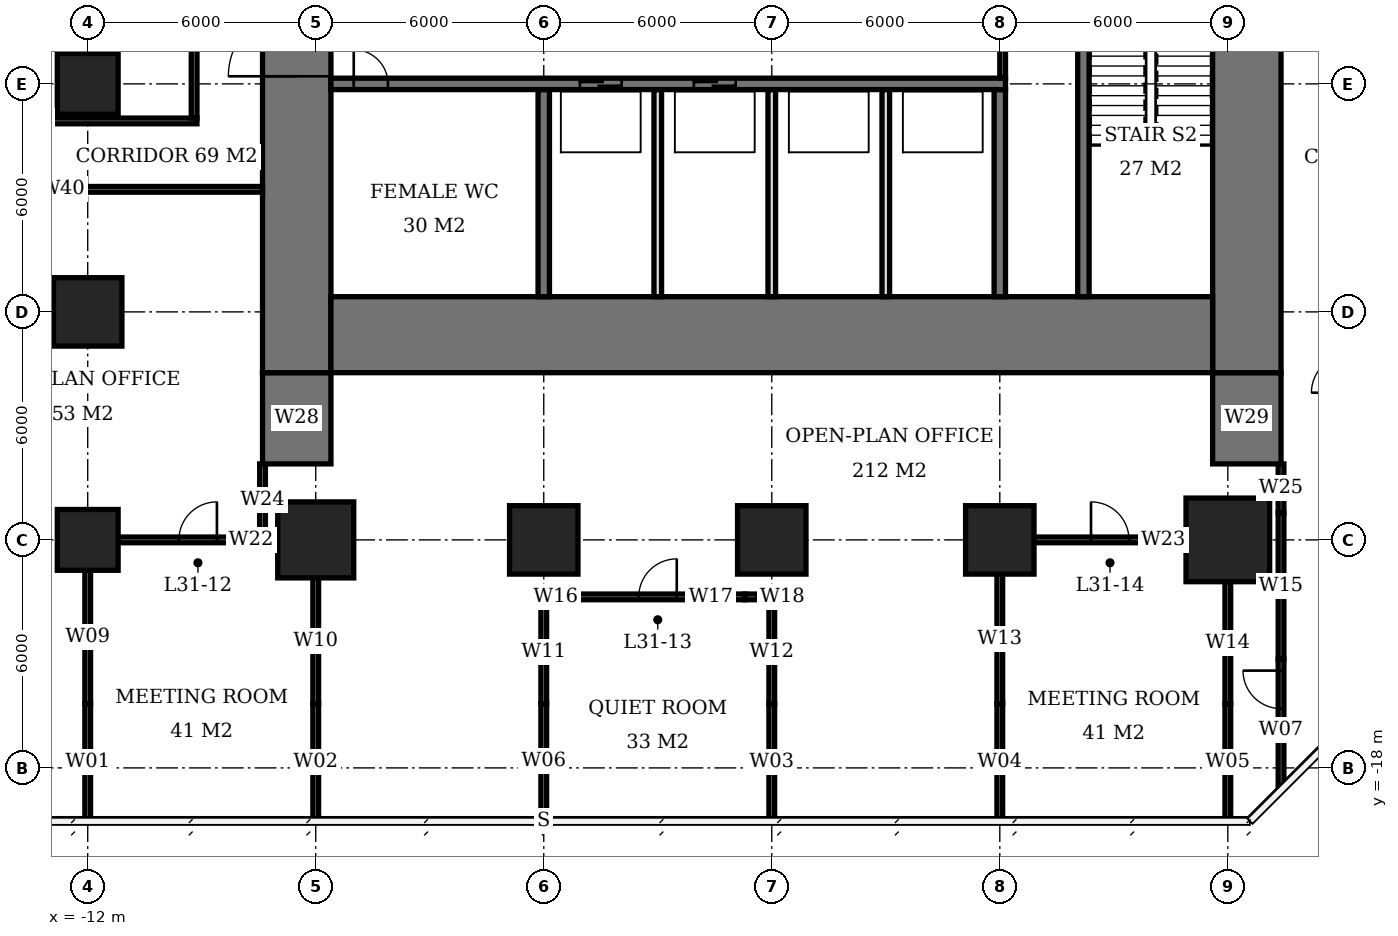
"""IFC4 building model, lengths in metres.
Left out: names, types, materials, properties, quantities, classifications, styles, units other than length and angle.
Written with IfcOpenShell. Run it as: python <this file> out.ifc"""

import sys

from ifc_helpers import new_model, si_unit, direction, frame, frame_2d, origin, origin_2d, place, context, subcontext, project, spatial, rectangle, extrude, element, fill, save


model = new_model("IFC4")
c1 = context("Model", 3, precision=1e-05, world=origin(), true_north=direction((0.0, 1.0)))
c2 = subcontext(c1, "Body", "Model", "MODEL_VIEW")
j1 = project(units=[si_unit("LENGTHUNIT", "METRE"), si_unit("PLANEANGLEUNIT", "RADIAN")], contexts=[c1])
p1 = place(None, origin())
s1 = spatial("IfcSite", under=j1, at=p1, CompositionType="ELEMENT")
p2 = place(p1, origin())
s2 = spatial("IfcBuilding", under=s1, at=p2, CompositionType="ELEMENT")
p3 = place(p2, frame((0.0, 0.0, 128.9)))
s3 = spatial("IfcBuildingStorey", under=s2, at=p3, CompositionType="ELEMENT", Elevation=128.9)
p4 = place(p3, frame((-12.0, -12.0, 0.0), z_axis=(0.0, 0.0, 1.0), x_axis=(1.0, 0.0, 0.0)))
e1 = element("IfcColumn", 1, at=p4, inside=s3, PredefinedType="COLUMN", context=c2, shape_type="SweptSolid", body=[
    extrude(rectangle(XDim=1.6, YDim=1.6, at=origin_2d()), origin(), (0.0, 0.0, 1.0), 3.9),
])
p5 = place(p3, frame((-12.0, -6.0, 0.0), z_axis=(0.0, 0.0, 1.0), x_axis=(1.0, 0.0, 0.0)))
e2 = element("IfcColumn", 2, at=p5, inside=s3, PredefinedType="COLUMN", context=c2, shape_type="SweptSolid", body=[
    extrude(rectangle(XDim=1.8, YDim=1.8, at=origin_2d()), origin(), (0.0, 0.0, 1.0), 3.9),
])
p6 = place(p3, frame((-12.0, 0.0, 0.0), z_axis=(0.0, 0.0, 1.0), x_axis=(1.0, 0.0, 0.0)))
e3 = element("IfcColumn", 3, at=p6, inside=s3, PredefinedType="COLUMN", context=c2, shape_type="SweptSolid", body=[
    extrude(rectangle(XDim=1.6, YDim=1.6, at=origin_2d()), origin(), (0.0, 0.0, 1.0), 3.9),
])
p7 = place(p3, frame((-6.0, -12.0, 0.0), z_axis=(0.0, 0.0, 1.0), x_axis=(1.0, 0.0, 0.0)))
e4 = element("IfcColumn", 4, at=p7, inside=s3, PredefinedType="COLUMN", context=c2, shape_type="SweptSolid", body=[
    extrude(rectangle(XDim=2.0, YDim=2.0, at=origin_2d()), origin(), (0.0, 0.0, 1.0), 3.9),
])
for number, where, z_axis, x_axis in (
    (5, (0.0, -12.0, 0.0), (0.0, 0.0, 1.0), (1.0, 0.0, 0.0)),
    (6, (6.0, -12.0, 0.0), (0.0, 0.0, 1.0), (1.0, 0.0, 0.0)),
    (7, (12.0, -12.0, 0.0), (0.0, 0.0, 1.0), (1.0, 0.0, 0.0)),
):
    element("IfcColumn", number, at=place(p3, frame(where, z_axis=z_axis, x_axis=x_axis)), inside=s3, PredefinedType="COLUMN", context=c2, shape_type="SweptSolid", body=[
        extrude(rectangle(XDim=1.8, YDim=1.8, at=origin_2d()), origin(), (0.0, 0.0, 1.0), 3.9),
    ])
p8 = place(p3, frame((18.0, -12.0, 0.0), z_axis=(0.0, 0.0, 1.0), x_axis=(1.0, 0.0, 0.0)))
e8 = element("IfcColumn", 8, at=p8, inside=s3, PredefinedType="COLUMN", context=c2, shape_type="SweptSolid", body=[
    extrude(rectangle(XDim=2.2, YDim=2.2, at=origin_2d()), origin(), (0.0, 0.0, 1.0), 3.9),
])
p9 = place(p3, frame((-5.6, -6.6, 0.0), z_axis=(0.0, 0.0, 1.0), x_axis=(1.0, 0.0, 0.0)))
e9 = element("IfcWall", 9, at=p9, inside=s3, PredefinedType="SHEAR", context=c2, shape_type="SweptSolid", body=[
    extrude(rectangle(XDim=23.2, YDim=2.0, at=frame_2d((11.6, 0.0))), origin(), (0.0, 0.0, 1.0), 3.9),
])
p10 = place(p3, frame((-6.5, -7.6, 0.0), z_axis=(0.0, 0.0, 1.0), x_axis=(0.0, 1.0, 0.0)))
e10 = element("IfcWall", 10, at=p10, inside=s3, PredefinedType="SHEAR", context=c2, shape_type="SweptSolid", body=[
    extrude(rectangle(XDim=21.2, YDim=1.8, at=frame_2d((10.6, 0.0))), origin(), (0.0, 0.0, 1.0), 3.9),
])
p11 = place(p10, frame((7.8, 0.0, 0.0)))
e11 = element("IfcOpeningElement", 11, at=p11, cuts=e10, PredefinedType="OPENING", context=c2, shape_type="SweptSolid", body=[
    extrude(rectangle(XDim=1.8, YDim=2.4, at=frame_2d((0.9, 1.2))), frame((0.0, 0.91, 0.0), z_axis=(0.0, -1.0, 0.0), x_axis=(1.0, 0.0, 0.0)), (0.0, 0.0, 1.0), 1.82),
])
p12 = place(p3, frame((18.5, -7.6, 0.0), z_axis=(0.0, 0.0, 1.0), x_axis=(0.0, 1.0, 0.0)))
e12 = element("IfcWall", 12, at=p12, inside=s3, PredefinedType="SHEAR", context=c2, shape_type="SweptSolid", body=[
    extrude(rectangle(XDim=21.2, YDim=1.8, at=frame_2d((10.6, 0.0))), origin(), (0.0, 0.0, 1.0), 3.9),
])
p13 = place(p12, frame((9.2, 0.0, 0.0)))
e13 = element("IfcOpeningElement", 13, at=p13, cuts=e12, PredefinedType="OPENING", context=c2, shape_type="SweptSolid", body=[
    extrude(rectangle(XDim=1.8, YDim=2.4, at=frame_2d((0.9, 1.2))), frame((0.0, 0.91, 0.0), z_axis=(0.0, -1.0, 0.0), x_axis=(1.0, 0.0, 0.0)), (0.0, 0.0, 1.0), 1.82),
])
for number, where, z_axis, x_axis in (
    (14, (-6.5, -10.0, 0.0), (0.0, 0.0, 1.0), (0.0, 1.0, 0.0)),
    (15, (18.5, -10.0, 0.0), (0.0, 0.0, 1.0), (0.0, 1.0, 0.0)),
):
    element("IfcWall", number, at=place(p3, frame(where, z_axis=z_axis, x_axis=x_axis)), inside=s3, PredefinedType="SHEAR", context=c2, shape_type="SweptSolid", body=[
        extrude(rectangle(XDim=2.4, YDim=1.8, at=frame_2d((1.2, 0.0))), origin(), (0.0, 0.0, 1.0), 3.9),
    ])
p14 = place(p3, frame((-5.6, 0.0, 0.0), z_axis=(0.0, 0.0, 1.0), x_axis=(1.0, 0.0, 0.0)))
e16 = element("IfcWall", 16, at=p14, inside=s3, PredefinedType="SHEAR", context=c2, shape_type="SweptSolid", body=[
    extrude(rectangle(XDim=17.75, YDim=0.3, at=frame_2d((8.875, 0.0))), origin(), (0.0, 0.0, 1.0), 3.9),
])
p15 = place(p14, frame((0.6, 0.0, 0.0)))
e17 = element("IfcOpeningElement", 17, at=p15, cuts=e16, PredefinedType="OPENING", context=c2, shape_type="SweptSolid", body=[
    extrude(rectangle(XDim=0.9, YDim=2.1, at=frame_2d((0.45, 1.05))), frame((0.0, 0.16, 0.0), z_axis=(0.0, -1.0, 0.0), x_axis=(1.0, 0.0, 0.0)), (0.0, 0.0, 1.0), 0.32),
])
p16 = place(p14, frame((6.55, 0.0, 0.0)))
e18 = element("IfcOpeningElement", 18, at=p16, cuts=e16, PredefinedType="OPENING", context=c2, shape_type="SweptSolid", body=[
    extrude(rectangle(XDim=1.1, YDim=2.1, at=frame_2d((0.55, 1.05))), frame((0.0, 0.16, 0.0), z_axis=(0.0, -1.0, 0.0), x_axis=(1.0, 0.0, 0.0)), (0.0, 0.0, 1.0), 0.32),
])
p17 = place(p14, frame((9.55, 0.0, 0.0)))
e19 = element("IfcOpeningElement", 19, at=p17, cuts=e16, PredefinedType="OPENING", context=c2, shape_type="SweptSolid", body=[
    extrude(rectangle(XDim=1.1, YDim=2.1, at=frame_2d((0.55, 1.05))), frame((0.0, 0.16, 0.0), z_axis=(0.0, -1.0, 0.0), x_axis=(1.0, 0.0, 0.0)), (0.0, 0.0, 1.0), 0.32),
])
for number, where, z_axis, x_axis in (
    (20, (0.0, -5.6, 0.0), (0.0, 0.0, 1.0), (0.0, 1.0, 0.0)),
    (21, (12.0, -5.6, 0.0), (0.0, 0.0, 1.0), (0.0, 1.0, 0.0)),
):
    element("IfcWall", number, at=place(p3, frame(where, z_axis=z_axis, x_axis=x_axis)), inside=s3, PredefinedType="SHEAR", context=c2, shape_type="SweptSolid", body=[
        extrude(rectangle(XDim=5.45, YDim=0.3, at=frame_2d((2.725, 0.0))), origin(), (0.0, 0.0, 1.0), 3.9),
    ])
p18 = place(p3, frame((14.2, -5.6, 0.0), z_axis=(0.0, 0.0, 1.0), x_axis=(0.0, 1.0, 0.0)))
e22 = element("IfcWall", 22, at=p18, inside=s3, PredefinedType="SHEAR", context=c2, shape_type="SweptSolid", body=[
    extrude(rectangle(XDim=8.45, YDim=0.3, at=frame_2d((4.225, 0.0))), origin(), (0.0, 0.0, 1.0), 3.9),
])
for number, where, z_axis, x_axis in (
    (23, (3.0, -5.6, 0.0), (0.0, 0.0, 1.0), (0.0, 1.0, 0.0)),
    (24, (6.0, -5.6, 0.0), (0.0, 0.0, 1.0), (0.0, 1.0, 0.0)),
    (25, (9.0, -5.6, 0.0), (0.0, 0.0, 1.0), (0.0, 1.0, 0.0)),
):
    element("IfcWall", number, at=place(p3, frame(where, z_axis=z_axis, x_axis=x_axis)), inside=s3, PredefinedType="SOLIDWALL", context=c2, shape_type="SweptSolid", body=[
        extrude(rectangle(XDim=5.45, YDim=0.2, at=frame_2d((2.725, 0.0))), origin(), (0.0, 0.0, 1.0), 3.9),
    ])
p19 = place(p3, frame((-0.075, -13.5, 0.0), z_axis=(0.0, 0.0, 1.0), x_axis=(1.0, 0.0, 0.0)))
e26 = element("IfcWall", 26, at=p19, inside=s3, PredefinedType="PARTITIONING", context=c2, shape_type="SweptSolid", body=[
    extrude(rectangle(XDim=0.785, YDim=0.15, at=frame_2d((0.393, 0.0))), origin(), (0.0, 0.0, 1.0), 2.65),
])
p20 = place(p3, frame((0.71, -13.5, 0.0), z_axis=(0.0, 0.0, 1.0), x_axis=(1.0, 0.0, 0.0)))
e27 = element("IfcWall", 27, at=p20, inside=s3, PredefinedType="PARTITIONING", context=c2, shape_type="SweptSolid", body=[
    extrude(rectangle(XDim=4.58, YDim=0.15, at=frame_2d((2.29, 0.0))), origin(), (0.0, 0.0, 1.0), 3.65),
])
p21 = place(p20, frame((1.79, 0.0, 0.0)))
e28 = element("IfcOpeningElement", 28, at=p21, cuts=e27, PredefinedType="OPENING", context=c2, shape_type="SweptSolid", body=[
    extrude(rectangle(XDim=1.0, YDim=2.1, at=frame_2d((0.5, 1.05))), frame((0.0, 0.085, 0.0), z_axis=(0.0, -1.0, 0.0), x_axis=(1.0, 0.0, 0.0)), (0.0, 0.0, 1.0), 0.17),
])
p22 = place(p3, frame((5.29, -13.5, 0.0), z_axis=(0.0, 0.0, 1.0), x_axis=(1.0, 0.0, 0.0)))
e29 = element("IfcWall", 29, at=p22, inside=s3, PredefinedType="PARTITIONING", context=c2, shape_type="SweptSolid", body=[
    extrude(rectangle(XDim=0.785, YDim=0.15, at=frame_2d((0.393, 0.0))), origin(), (0.0, 0.0, 1.0), 2.65),
])
p23 = place(p3, frame((-11.2, -12.0, 0.0), z_axis=(0.0, 0.0, 1.0), x_axis=(1.0, 0.0, 0.0)))
e30 = element("IfcWall", 30, at=p23, inside=s3, PredefinedType="PARTITIONING", context=c2, shape_type="SweptSolid", body=[
    extrude(rectangle(XDim=4.2, YDim=0.15, at=frame_2d((2.1, 0.0))), origin(), (0.0, 0.0, 1.0), 3.65),
])
p24 = place(p23, frame((1.6, 0.0, 0.0)))
e31 = element("IfcOpeningElement", 31, at=p24, cuts=e30, PredefinedType="OPENING", context=c2, shape_type="SweptSolid", body=[
    extrude(rectangle(XDim=1.0, YDim=2.1, at=frame_2d((0.5, 1.05))), frame((0.0, 0.085, 0.0), z_axis=(0.0, -1.0, 0.0), x_axis=(1.0, 0.0, 0.0)), (0.0, 0.0, 1.0), 0.17),
])
p25 = place(p3, frame((12.9, -12.0, 0.0), z_axis=(0.0, 0.0, 1.0), x_axis=(1.0, 0.0, 0.0)))
e32 = element("IfcWall", 32, at=p25, inside=s3, PredefinedType="PARTITIONING", context=c2, shape_type="SweptSolid", body=[
    extrude(rectangle(XDim=4.0, YDim=0.15, at=frame_2d((2.0, 0.0))), origin(), (0.0, 0.0, 1.0), 3.65),
])
p26 = place(p25, frame((1.5, 0.0, 0.0)))
e33 = element("IfcOpeningElement", 33, at=p26, cuts=e32, PredefinedType="OPENING", context=c2, shape_type="SweptSolid", body=[
    extrude(rectangle(XDim=1.0, YDim=2.1, at=frame_2d((0.5, 1.05))), frame((0.0, 0.085, 0.0), z_axis=(0.0, -1.0, 0.0), x_axis=(1.0, 0.0, 0.0)), (0.0, 0.0, 1.0), 0.17),
])
p27 = place(p3, frame((-12.0, -19.4, 0.0), z_axis=(0.0, 0.0, 1.0), x_axis=(0.0, 1.0, 0.0)))
e34 = element("IfcWall", 34, at=p27, inside=s3, PredefinedType="PARTITIONING", context=c2, shape_type="SweptSolid", body=[
    extrude(rectangle(XDim=3.09, YDim=0.15, at=frame_2d((1.545, 0.0))), origin(), (0.0, 0.0, 1.0), 3.65),
])
p28 = place(p3, frame((-12.0, -16.31, 0.0), z_axis=(0.0, 0.0, 1.0), x_axis=(0.0, 1.0, 0.0)))
e35 = element("IfcWall", 35, at=p28, inside=s3, PredefinedType="PARTITIONING", context=c2, shape_type="SweptSolid", body=[
    extrude(rectangle(XDim=3.51, YDim=0.15, at=frame_2d((1.755, 0.0))), origin(), (0.0, 0.0, 1.0), 2.65),
])
p29 = place(p3, frame((-6.0, -19.4, 0.0), z_axis=(0.0, 0.0, 1.0), x_axis=(0.0, 1.0, 0.0)))
e36 = element("IfcWall", 36, at=p29, inside=s3, PredefinedType="PARTITIONING", context=c2, shape_type="SweptSolid", body=[
    extrude(rectangle(XDim=3.09, YDim=0.15, at=frame_2d((1.545, 0.0))), origin(), (0.0, 0.0, 1.0), 3.65),
])
p30 = place(p3, frame((-6.0, -16.31, 0.0), z_axis=(0.0, 0.0, 1.0), x_axis=(0.0, 1.0, 0.0)))
e37 = element("IfcWall", 37, at=p30, inside=s3, PredefinedType="PARTITIONING", context=c2, shape_type="SweptSolid", body=[
    extrude(rectangle(XDim=3.31, YDim=0.15, at=frame_2d((1.655, 0.0))), origin(), (0.0, 0.0, 1.0), 2.65),
])
p31 = place(p3, frame((0.0, -19.35, 0.0), z_axis=(0.0, 0.0, 1.0), x_axis=(0.0, 1.0, 0.0)))
e38 = element("IfcWall", 38, at=p31, inside=s3, PredefinedType="PARTITIONING", context=c2, shape_type="SweptSolid", body=[
    extrude(rectangle(XDim=3.04, YDim=0.15, at=frame_2d((1.52, 0.0))), origin(), (0.0, 0.0, 1.0), 3.65),
])
p32 = place(p3, frame((0.0, -16.31, 0.0), z_axis=(0.0, 0.0, 1.0), x_axis=(0.0, 1.0, 0.0)))
e39 = element("IfcWall", 39, at=p32, inside=s3, PredefinedType="PARTITIONING", context=c2, shape_type="SweptSolid", body=[
    extrude(rectangle(XDim=2.735, YDim=0.15, at=frame_2d((1.368, 0.0))), origin(), (0.0, 0.0, 1.0), 2.65),
])
p33 = place(p3, frame((6.0, -19.4, 0.0), z_axis=(0.0, 0.0, 1.0), x_axis=(0.0, 1.0, 0.0)))
e40 = element("IfcWall", 40, at=p33, inside=s3, PredefinedType="PARTITIONING", context=c2, shape_type="SweptSolid", body=[
    extrude(rectangle(XDim=3.09, YDim=0.15, at=frame_2d((1.545, 0.0))), origin(), (0.0, 0.0, 1.0), 3.65),
])
p34 = place(p3, frame((6.0, -16.31, 0.0), z_axis=(0.0, 0.0, 1.0), x_axis=(0.0, 1.0, 0.0)))
e41 = element("IfcWall", 41, at=p34, inside=s3, PredefinedType="PARTITIONING", context=c2, shape_type="SweptSolid", body=[
    extrude(rectangle(XDim=2.735, YDim=0.15, at=frame_2d((1.368, 0.0))), origin(), (0.0, 0.0, 1.0), 2.65),
])
p35 = place(p3, frame((12.0, -19.4, 0.0), z_axis=(0.0, 0.0, 1.0), x_axis=(0.0, 1.0, 0.0)))
e42 = element("IfcWall", 42, at=p35, inside=s3, PredefinedType="PARTITIONING", context=c2, shape_type="SweptSolid", body=[
    extrude(rectangle(XDim=3.09, YDim=0.15, at=frame_2d((1.545, 0.0))), origin(), (0.0, 0.0, 1.0), 3.65),
])
p36 = place(p3, frame((12.0, -16.31, 0.0), z_axis=(0.0, 0.0, 1.0), x_axis=(0.0, 1.0, 0.0)))
e43 = element("IfcWall", 43, at=p36, inside=s3, PredefinedType="PARTITIONING", context=c2, shape_type="SweptSolid", body=[
    extrude(rectangle(XDim=3.41, YDim=0.15, at=frame_2d((1.705, 0.0))), origin(), (0.0, 0.0, 1.0), 2.65),
])
p37 = place(p3, frame((18.0, -19.4, 0.0), z_axis=(0.0, 0.0, 1.0), x_axis=(0.0, 1.0, 0.0)))
e44 = element("IfcWall", 44, at=p37, inside=s3, PredefinedType="PARTITIONING", context=c2, shape_type="SweptSolid", body=[
    extrude(rectangle(XDim=3.09, YDim=0.15, at=frame_2d((1.545, 0.0))), origin(), (0.0, 0.0, 1.0), 3.65),
])
p38 = place(p3, frame((18.0, -16.31, 0.0), z_axis=(0.0, 0.0, 1.0), x_axis=(0.0, 1.0, 0.0)))
e45 = element("IfcWall", 45, at=p38, inside=s3, PredefinedType="PARTITIONING", context=c2, shape_type="SweptSolid", body=[
    extrude(rectangle(XDim=3.21, YDim=0.15, at=frame_2d((1.605, 0.0))), origin(), (0.0, 0.0, 1.0), 2.65),
])
p39 = place(p3, frame((-17.925, -2.775, 0.0), z_axis=(0.0, 0.0, 1.0), x_axis=(1.0, 0.0, 0.0)))
e46 = element("IfcWall", 46, at=p39, inside=s3, PredefinedType="PARTITIONING", context=c2, shape_type="SweptSolid", body=[
    extrude(rectangle(XDim=10.525, YDim=0.15, at=frame_2d((5.263, 0.0))), origin(), (0.0, 0.0, 1.0), 3.65),
])
p40 = place(p39, frame((2.554, 0.0, 0.0)))
e47 = element("IfcOpeningElement", 47, at=p40, cuts=e46, PredefinedType="OPENING", context=c2, shape_type="SweptSolid", body=[
    extrude(rectangle(XDim=1.0, YDim=2.1, at=frame_2d((0.5, 1.05))), frame((0.0, 0.085, 0.0), z_axis=(0.0, -1.0, 0.0), x_axis=(1.0, 0.0, 0.0)), (0.0, 0.0, 1.0), 0.17),
])
p41 = place(p3, frame((-17.925, -0.975, 0.0), z_axis=(0.0, 0.0, 1.0), x_axis=(1.0, 0.0, 0.0)))
e48 = element("IfcWall", 48, at=p41, inside=s3, PredefinedType="PARTITIONING", context=c2, shape_type="SweptSolid", body=[
    extrude(rectangle(XDim=8.8, YDim=0.15, at=frame_2d((4.4, 0.0))), origin(), (0.0, 0.0, 1.0), 3.65),
])
p42 = place(p3, frame((-9.2, -0.9, 0.0), z_axis=(0.0, 0.0, 1.0), x_axis=(0.0, 1.0, 0.0)))
e49 = element("IfcWall", 49, at=p42, inside=s3, PredefinedType="PARTITIONING", context=c2, shape_type="SweptSolid", body=[
    extrude(rectangle(XDim=11.325, YDim=0.15, at=frame_2d((5.663, 0.0))), origin(), (0.0, 0.0, 1.0), 3.65),
])
p43 = place(p42, frame((3.441, 0.0, 0.0)))
e50 = element("IfcOpeningElement", 50, at=p43, cuts=e49, PredefinedType="OPENING", context=c2, shape_type="SweptSolid", body=[
    extrude(rectangle(XDim=1.0, YDim=2.1, at=frame_2d((0.5, 1.05))), frame((0.0, 0.085, 0.0), z_axis=(0.0, -1.0, 0.0), x_axis=(1.0, 0.0, 0.0)), (0.0, 0.0, 1.0), 0.17),
])
p44 = place(p3, frame((-7.4, -11.925, 0.0), z_axis=(0.0, 0.0, 1.0), x_axis=(0.0, 1.0, 0.0)))
e51 = element("IfcWall", 51, at=p44, inside=s3, PredefinedType="PARTITIONING", context=c2, shape_type="SweptSolid", body=[
    extrude(rectangle(XDim=1.925, YDim=0.15, at=frame_2d((0.962, 0.0))), origin(), (0.0, 0.0, 1.0), 3.65),
])
p45 = place(p3, frame((19.4, -18.489, 0.0), z_axis=(0.0, 0.0, 1.0), x_axis=(0.0, 1.0, 0.0)))
e52 = element("IfcWall", 52, at=p45, inside=s3, PredefinedType="PARTITIONING", context=c2, shape_type="SweptSolid", body=[
    extrude(rectangle(XDim=3.349, YDim=0.15, at=frame_2d((1.675, 0.0))), origin(), (0.0, 0.0, 1.0), 3.65),
])
p46 = place(p45, frame((2.049, 0.0, 0.0)))
e53 = element("IfcOpeningElement", 53, at=p46, cuts=e52, PredefinedType="OPENING", context=c2, shape_type="SweptSolid", body=[
    extrude(rectangle(XDim=1.0, YDim=2.1, at=frame_2d((0.5, 1.05))), frame((0.0, 0.085, 0.0), z_axis=(0.0, -1.0, 0.0), x_axis=(1.0, 0.0, 0.0)), (0.0, 0.0, 1.0), 0.17),
])
p47 = place(p3, frame((19.4, -15.14, 0.0), z_axis=(0.0, 0.0, 1.0), x_axis=(0.0, 1.0, 0.0)))
e54 = element("IfcWall", 54, at=p47, inside=s3, PredefinedType="PARTITIONING", context=c2, shape_type="SweptSolid", body=[
    extrude(rectangle(XDim=3.85, YDim=0.15, at=frame_2d((1.925, 0.0))), origin(), (0.0, 0.0, 1.0), 2.65),
])
p48 = place(p3, frame((19.4, -11.29, 0.0), z_axis=(0.0, 0.0, 1.0), x_axis=(0.0, 1.0, 0.0)))
e55 = element("IfcWall", 55, at=p48, inside=s3, PredefinedType="PARTITIONING", context=c2, shape_type="SweptSolid", body=[
    extrude(rectangle(XDim=1.29, YDim=0.15, at=frame_2d((0.645, 0.0))), origin(), (0.0, 0.0, 1.0), 3.65),
])
p49 = place(p3, frame((12.075, 0.15, 0.0), z_axis=(0.0, 0.0, 1.0), x_axis=(0.0, 1.0, 0.0)))
e56 = element("IfcWall", 56, at=p49, inside=s3, PredefinedType="PARTITIONING", context=c2, shape_type="SweptSolid", body=[
    extrude(rectangle(XDim=3.0, YDim=0.15, at=frame_2d((1.5, 0.0))), origin(), (0.0, 0.0, 1.0), 3.65),
])
p50 = place(p11, origin())
e57 = element("IfcDoor", 57, at=p50, inside=s3, OperationType="DOUBLE_DOOR_SINGLE_SWING", PredefinedType="DOOR", context=c2, shape_type="SweptSolid", body=[
    extrude(rectangle(XDim=1.8, YDim=2.4, at=frame_2d((0.9, 1.2))), frame((0.0, 0.025, 0.0), z_axis=(0.0, -1.0, 0.0), x_axis=(1.0, 0.0, 0.0)), (0.0, 0.0, 1.0), 0.05),
])
fill(e11, e57)
p51 = place(p15, origin())
e58 = element("IfcDoor", 58, at=p51, inside=s3, OperationType="SINGLE_SWING_LEFT", PredefinedType="DOOR", context=c2, shape_type="SweptSolid", body=[
    extrude(rectangle(XDim=0.9, YDim=2.1, at=frame_2d((0.45, 1.05))), frame((0.0, 0.025, 0.0), z_axis=(0.0, -1.0, 0.0), x_axis=(1.0, 0.0, 0.0)), (0.0, 0.0, 1.0), 0.05),
])
fill(e17, e58)
p52 = place(p16, origin())
e59 = element("IfcDoor", 59, at=p52, inside=s3, OperationType="DOUBLE_DOOR_SLIDING", PredefinedType="USERDEFINED", context=c2, shape_type="SweptSolid", body=[
    extrude(rectangle(XDim=1.1, YDim=2.1, at=frame_2d((0.55, 1.05))), frame((0.0, 0.025, 0.0), z_axis=(0.0, -1.0, 0.0), x_axis=(1.0, 0.0, 0.0)), (0.0, 0.0, 1.0), 0.05),
])
fill(e18, e59)
p53 = place(p17, origin())
e60 = element("IfcDoor", 60, at=p53, inside=s3, OperationType="DOUBLE_DOOR_SLIDING", PredefinedType="USERDEFINED", context=c2, shape_type="SweptSolid", body=[
    extrude(rectangle(XDim=1.1, YDim=2.1, at=frame_2d((0.55, 1.05))), frame((0.0, 0.025, 0.0), z_axis=(0.0, -1.0, 0.0), x_axis=(1.0, 0.0, 0.0)), (0.0, 0.0, 1.0), 0.05),
])
fill(e19, e60)
p54 = place(p24, origin())
e61 = element("IfcDoor", 61, at=p54, inside=s3, OperationType="SINGLE_SWING_RIGHT", PredefinedType="DOOR", context=c2, shape_type="SweptSolid", body=[
    extrude(rectangle(XDim=1.0, YDim=2.1, at=frame_2d((0.5, 1.05))), frame((0.0, 0.025, 0.0), z_axis=(0.0, -1.0, 0.0), x_axis=(1.0, 0.0, 0.0)), (0.0, 0.0, 1.0), 0.05),
])
fill(e31, e61)
p55 = place(p21, origin())
e62 = element("IfcDoor", 62, at=p55, inside=s3, OperationType="SINGLE_SWING_RIGHT", PredefinedType="DOOR", context=c2, shape_type="SweptSolid", body=[
    extrude(rectangle(XDim=1.0, YDim=2.1, at=frame_2d((0.5, 1.05))), frame((0.0, 0.025, 0.0), z_axis=(0.0, -1.0, 0.0), x_axis=(1.0, 0.0, 0.0)), (0.0, 0.0, 1.0), 0.05),
])
fill(e28, e62)
p56 = place(p26, origin())
e63 = element("IfcDoor", 63, at=p56, inside=s3, OperationType="SINGLE_SWING_LEFT", PredefinedType="DOOR", context=c2, shape_type="SweptSolid", body=[
    extrude(rectangle(XDim=1.0, YDim=2.1, at=frame_2d((0.5, 1.05))), frame((0.0, 0.025, 0.0), z_axis=(0.0, -1.0, 0.0), x_axis=(1.0, 0.0, 0.0)), (0.0, 0.0, 1.0), 0.05),
])
fill(e33, e63)
p57 = place(p46, origin())
e64 = element("IfcDoor", 64, at=p57, inside=s3, OperationType="SINGLE_SWING_RIGHT", PredefinedType="DOOR", context=c2, shape_type="SweptSolid", body=[
    extrude(rectangle(XDim=1.0, YDim=2.1, at=frame_2d((0.5, 1.05))), frame((0.0, 0.025, 0.0), z_axis=(0.0, -1.0, 0.0), x_axis=(1.0, 0.0, 0.0)), (0.0, 0.0, 1.0), 0.05),
])
fill(e53, e64)
save(model, sys.argv[1])
